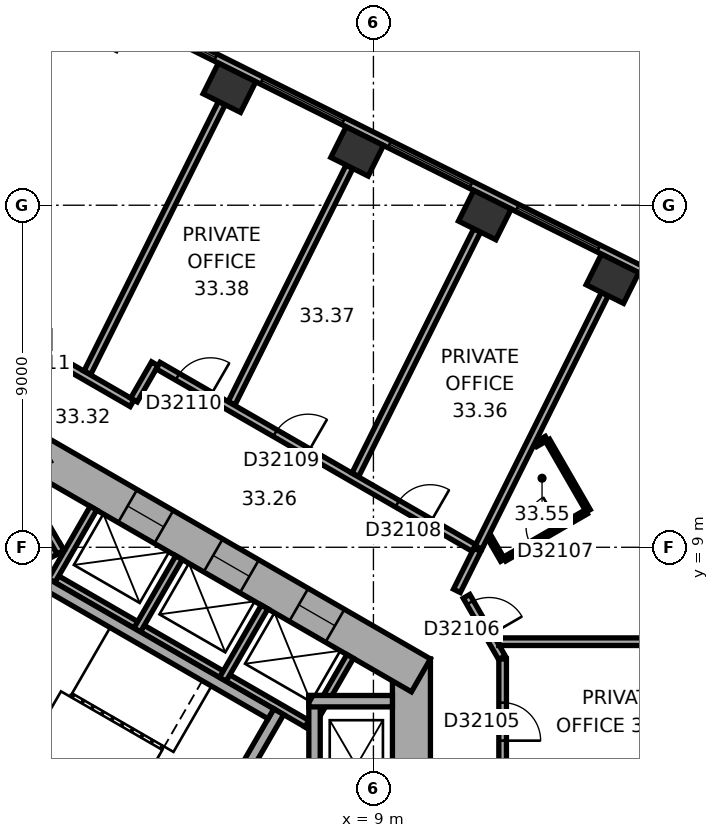
"""IFC4 building model, lengths in metres.
Left out: names, types, materials, properties, quantities, classifications, styles, units other than length and angle.
Written with IfcOpenShell. Run it as: python <this file> out.ifc"""

import sys

from ifc_helpers import new_model, si_unit, direction, frame, frame_2d, origin, origin_2d, place, context, subcontext, project, spatial, rectangle, extrude, element, fill, save


model = new_model("IFC4")
c1 = context("Model", 3, precision=1e-05, world=origin(), true_north=direction((0.0, 1.0)))
c2 = subcontext(c1, "Body", "Model", "MODEL_VIEW")
j1 = project(units=[si_unit("LENGTHUNIT", "METRE"), si_unit("PLANEANGLEUNIT", "RADIAN")], contexts=[c1])
p1 = place(None, origin())
s1 = spatial("IfcSite", under=j1, at=p1, CompositionType="ELEMENT")
p2 = place(p1, origin())
s2 = spatial("IfcBuilding", under=s1, at=p2, CompositionType="ELEMENT")
p3 = place(p2, frame((0.0, 0.0, 135.5)))
s3 = spatial("IfcBuildingStorey", under=s2, at=p3, CompositionType="ELEMENT", Elevation=135.5)
for number, where, z_axis, x_axis in (
    (1, (15.29, 16.065, 0.0), (0.0, 0.0, 1.0), (-0.895, 0.446, 0.0)),
    (2, (11.931, 17.74, 0.0), (0.0, 0.0, 1.0), (-0.895, 0.446, 0.0)),
    (3, (8.571, 19.416, 0.0), (0.0, 0.0, 1.0), (-0.895, 0.446, 0.0)),
    (4, (5.211, 21.091, 0.0), (0.0, 0.0, 1.0), (-0.895, 0.446, 0.0)),
):
    element("IfcColumn", number, at=place(p3, frame(where, z_axis=z_axis, x_axis=x_axis)), inside=s3, PredefinedType="COLUMN", context=c2, shape_type="SweptSolid", body=[
        extrude(rectangle(XDim=1.1, YDim=0.9, at=origin_2d()), origin(), (0.0, 0.0, 1.0), 3.7),
    ])
p4 = place(p3, frame((10.0, -6.062, 0.0), z_axis=(0.0, 0.0, 1.0), x_axis=(0.0, 1.0, 0.0)))
e5 = element("IfcWall", 5, at=p4, inside=s3, PredefinedType="SHEAR", context=c2, shape_type="SweptSolid", body=[
    extrude(rectangle(XDim=12.125, YDim=1.0, at=frame_2d((6.062, 0.0))), origin(), (0.0, 0.0, 1.0), 3.7),
])
p5 = place(p4, frame((6.262, 0.0, 0.0)))
e6 = element("IfcOpeningElement", 6, at=p5, cuts=e5, PredefinedType="OPENING", context=c2, shape_type="SweptSolid", body=[
    extrude(rectangle(XDim=1.5, YDim=2.1, at=frame_2d((0.75, 1.05))), frame((0.0, 0.51, 0.0), z_axis=(0.0, -1.0, 0.0), x_axis=(1.0, 0.0, 0.0)), (0.0, 0.0, 1.0), 1.02),
])
p6 = place(p4, frame((1.712, 0.0, 0.0)))
e7 = element("IfcOpeningElement", 7, at=p6, cuts=e5, PredefinedType="OPENING", context=c2, shape_type="SweptSolid", body=[
    extrude(rectangle(XDim=1.1, YDim=2.1, at=frame_2d((0.55, 1.05))), frame((0.0, 0.51, 0.0), z_axis=(0.0, -1.0, 0.0), x_axis=(1.0, 0.0, 0.0)), (0.0, 0.0, 1.0), 1.02),
])
p7 = place(p4, frame((4.312, 0.0, 0.0)))
e8 = element("IfcOpeningElement", 8, at=p7, cuts=e5, PredefinedType="OPENING", context=c2, shape_type="SweptSolid", body=[
    extrude(rectangle(XDim=1.1, YDim=2.1, at=frame_2d((0.55, 1.05))), frame((0.0, 0.51, 0.0), z_axis=(0.0, -1.0, 0.0), x_axis=(1.0, 0.0, 0.0)), (0.0, 0.0, 1.0), 1.02),
])
p8 = place(p3, frame((10.25, 5.629, 0.0), z_axis=(0.0, 0.0, 1.0), x_axis=(-0.866022616891, 0.50000482701, 0.0)))
e9 = element("IfcWall", 9, at=p8, inside=s3, PredefinedType="SHEAR", context=c2, shape_type="SweptSolid", body=[
    extrude(rectangle(XDim=12.125, YDim=1.0, at=frame_2d((6.062, 0.0))), origin(), (0.0, 0.0, 1.0), 3.7),
])
p9 = place(p8, frame((2.612, 0.0, 0.0)))
e10 = element("IfcOpeningElement", 10, at=p9, cuts=e9, PredefinedType="OPENING", context=c2, shape_type="SweptSolid", body=[
    extrude(rectangle(XDim=1.1, YDim=2.1, at=frame_2d((0.55, 1.05))), frame((0.0, 0.51, 0.0), z_axis=(0.0, -1.0, 0.0), x_axis=(1.0, 0.0, 0.0)), (0.0, 0.0, 1.0), 1.02),
])
p10 = place(p8, frame((5.212, 0.0, 0.0)))
e11 = element("IfcOpeningElement", 11, at=p10, cuts=e9, PredefinedType="OPENING", context=c2, shape_type="SweptSolid", body=[
    extrude(rectangle(XDim=1.1, YDim=2.1, at=frame_2d((0.55, 1.05))), frame((0.0, 0.51, 0.0), z_axis=(0.0, -1.0, 0.0), x_axis=(1.0, 0.0, 0.0)), (0.0, 0.0, 1.0), 1.02),
])
p11 = place(p8, frame((7.812, 0.0, 0.0)))
e12 = element("IfcOpeningElement", 12, at=p11, cuts=e9, PredefinedType="OPENING", context=c2, shape_type="SweptSolid", body=[
    extrude(rectangle(XDim=1.1, YDim=2.1, at=frame_2d((0.55, 1.05))), frame((0.0, 0.51, 0.0), z_axis=(0.0, -1.0, 0.0), x_axis=(1.0, 0.0, 0.0)), (0.0, 0.0, 1.0), 1.02),
])
p12 = place(p3, frame((19.464, 14.599, 0.0), z_axis=(0.0, 0.0, 1.0), x_axis=(-0.894935755043, 0.446195018289, 0.0)))
e13 = element("IfcWall", 13, at=p12, inside=s3, PredefinedType="STANDARD", context=c2, shape_type="SweptSolid", body=[
    extrude(rectangle(XDim=20.044, YDim=0.2, at=frame_2d((10.022, 0.0))), origin(), (0.0, 0.0, 1.0), 3.7),
])
p13 = place(p12, frame((1.313, 0.0, 0.9)))
e14 = element("IfcOpeningElement", 14, at=p13, cuts=e13, PredefinedType="OPENING", context=c2, shape_type="SweptSolid", body=[
    extrude(rectangle(XDim=2.4, YDim=2.0, at=frame_2d((1.2, 1.0))), frame((0.0, 0.11, 0.0), z_axis=(0.0, -1.0, 0.0), x_axis=(1.0, 0.0, 0.0)), (0.0, 0.0, 1.0), 0.22),
])
p14 = place(p12, frame((5.067, 0.0, 0.9)))
e15 = element("IfcOpeningElement", 15, at=p14, cuts=e13, PredefinedType="OPENING", context=c2, shape_type="SweptSolid", body=[
    extrude(rectangle(XDim=2.4, YDim=2.0, at=frame_2d((1.2, 1.0))), frame((0.0, 0.11, 0.0), z_axis=(0.0, -1.0, 0.0), x_axis=(1.0, 0.0, 0.0)), (0.0, 0.0, 1.0), 0.22),
])
p15 = place(p12, frame((8.821, 0.0, 0.9)))
e16 = element("IfcOpeningElement", 16, at=p15, cuts=e13, PredefinedType="OPENING", context=c2, shape_type="SweptSolid", body=[
    extrude(rectangle(XDim=2.4, YDim=2.0, at=frame_2d((1.2, 1.0))), frame((0.0, 0.11, 0.0), z_axis=(0.0, -1.0, 0.0), x_axis=(1.0, 0.0, 0.0)), (0.0, 0.0, 1.0), 0.22),
])
p16 = place(p12, frame((12.575, 0.0, 0.9)))
e17 = element("IfcOpeningElement", 17, at=p16, cuts=e13, PredefinedType="OPENING", context=c2, shape_type="SweptSolid", body=[
    extrude(rectangle(XDim=2.4, YDim=2.0, at=frame_2d((1.2, 1.0))), frame((0.0, 0.11, 0.0), z_axis=(0.0, -1.0, 0.0), x_axis=(1.0, 0.0, 0.0)), (0.0, 0.0, 1.0), 0.22),
])
p17 = place(p12, frame((16.329, 0.0, 0.9)))
e18 = element("IfcOpeningElement", 18, at=p17, cuts=e13, PredefinedType="OPENING", context=c2, shape_type="SweptSolid", body=[
    extrude(rectangle(XDim=2.4, YDim=2.0, at=frame_2d((1.2, 1.0))), frame((0.0, 0.11, 0.0), z_axis=(0.0, -1.0, 0.0), x_axis=(1.0, 0.0, 0.0)), (0.0, 0.0, 1.0), 0.22),
])
p18 = place(p3, frame((7.424, 4.259, 0.0), z_axis=(0.0, 0.0, 1.0), x_axis=(-0.866026010844, 0.49999894854, 0.0)))
e19 = element("IfcWall", 19, at=p18, inside=s3, PredefinedType="PARTITIONING", context=c2, shape_type="SweptSolid", body=[
    extrude(rectangle(XDim=8.0, YDim=0.2, at=frame_2d((4.0, 0.0))), origin(), (0.0, 0.0, 1.0), 3.35),
])
for number, where, z_axis, x_axis in (
    (20, (7.287, 4.222, 0.0), (0.0, 0.0, 1.0), (0.5, 0.866, 0.0)),
    (21, (5.036, 5.522, 0.0), (0.0, 0.0, 1.0), (0.5, 0.866, 0.0)),
    (22, (2.784, 6.822, 0.0), (0.0, 0.0, 1.0), (0.5, 0.866, 0.0)),
    (23, (0.532, 8.122, 0.0), (0.0, 0.0, 1.0), (0.5, 0.866, 0.0)),
):
    element("IfcWall", number, at=place(p3, frame(where, z_axis=z_axis, x_axis=x_axis)), inside=s3, PredefinedType="PARTITIONING", context=c2, shape_type="SweptSolid", body=[
        extrude(rectangle(XDim=2.2, YDim=0.2, at=frame_2d((1.1, 0.0))), origin(), (0.0, 0.0, 1.0), 3.35),
    ])
p19 = place(p3, frame((0.803, 9.009, 0.0), z_axis=(0.0, 0.0, 1.0), x_axis=(-0.866028230842, -0.499995103361, 0.0)))
e24 = element("IfcWall", 24, at=p19, inside=s3, PredefinedType="PARTITIONING", context=c2, shape_type="SweptSolid", body=[
    extrude(rectangle(XDim=5.4, YDim=0.2, at=frame_2d((2.7, 0.0))), origin(), (0.0, 0.0, 1.0), 3.35),
])
p20 = place(p3, frame((0.767, 8.872, 0.0), z_axis=(0.0, 0.0, 1.0), x_axis=(-0.499994660107, 0.866028486751, 0.0)))
e25 = element("IfcWall", 25, at=p20, inside=s3, PredefinedType="PARTITIONING", context=c2, shape_type="SweptSolid", body=[
    extrude(rectangle(XDim=2.2, YDim=0.2, at=frame_2d((1.1, 0.0))), origin(), (0.0, 0.0, 1.0), 3.35),
])
p21 = place(p3, frame((4.158, 0.602, 0.0), z_axis=(0.0, 0.0, 1.0), x_axis=(0.499977259774, 0.866038532462, 0.0)))
e26 = element("IfcWall", 26, at=p21, inside=s3, PredefinedType="SHEAR", context=c2, shape_type="SweptSolid", body=[
    extrude(rectangle(XDim=4.7, YDim=0.3, at=frame_2d((2.35, 0.0))), origin(), (0.0, 0.0, 1.0), 3.35),
])
p22 = place(p21, frame((0.8, 0.0, 0.0)))
e27 = element("IfcOpeningElement", 27, at=p22, cuts=e26, PredefinedType="OPENING", context=c2, shape_type="SweptSolid", body=[
    extrude(rectangle(XDim=1.2, YDim=2.1, at=frame_2d((0.6, 1.05))), frame((0.0, 0.16, 0.0), z_axis=(0.0, -1.0, 0.0), x_axis=(1.0, 0.0, 0.0)), (0.0, 0.0, 1.0), 0.32),
])
for number, where, z_axis, x_axis in (
    (28, (4.103, 0.807, 0.0), (0.0, 0.0, 1.0), (-0.866, 0.5, 0.0)),
    (29, (6.303, 4.617, 0.0), (0.0, 0.0, 1.0), (-0.866, 0.5, 0.0)),
):
    element("IfcWall", number, at=place(p3, frame(where, z_axis=z_axis, x_axis=x_axis)), inside=s3, PredefinedType="SHEAR", context=c2, shape_type="SweptSolid", body=[
        extrude(rectangle(XDim=7.06, YDim=0.3, at=frame_2d((3.53, 0.0))), origin(), (0.0, 0.0, 1.0), 3.35),
    ])
p23 = place(p3, frame((7.45, 1.75, 0.0), z_axis=(0.0, 0.0, 1.0), x_axis=(0.0, 1.0, 0.0)))
e30 = element("IfcWall", 30, at=p23, inside=s3, PredefinedType="SHEAR", context=c2, shape_type="SweptSolid", body=[
    extrude(rectangle(XDim=3.35, YDim=0.3, at=frame_2d((1.675, 0.0))), origin(), (0.0, 0.0, 1.0), 3.35),
])
p24 = place(p3, frame((7.3, 4.95, 0.0), z_axis=(0.0, 0.0, 1.0), x_axis=(1.0, 0.0, 0.0)))
e31 = element("IfcWall", 31, at=p24, inside=s3, PredefinedType="SHEAR", context=c2, shape_type="SweptSolid", body=[
    extrude(rectangle(XDim=2.2, YDim=0.3, at=frame_2d((1.1, 0.0))), origin(), (0.0, 0.0, 1.0), 3.35),
])
p25 = place(p3, frame((0.95, 13.77, 0.0), z_axis=(0.0, 0.0, 1.0), x_axis=(-1.0, 0.0, 0.0)))
e32 = element("IfcWall", 32, at=p25, inside=s3, PredefinedType="PARTITIONING", context=c2, shape_type="SweptSolid", body=[
    extrude(rectangle(XDim=1.86, YDim=0.2, at=frame_2d((0.93, 0.0))), origin(), (0.0, 0.0, 1.0), 3.35),
])
p26 = place(p25, frame((0.43, 0.0, 0.0)))
e33 = element("IfcOpeningElement", 33, at=p26, cuts=e32, PredefinedType="OPENING", context=c2, shape_type="SweptSolid", body=[
    extrude(rectangle(XDim=1.0, YDim=2.1, at=frame_2d((0.5, 1.05))), frame((0.0, 0.11, 0.0), z_axis=(0.0, -1.0, 0.0), x_axis=(1.0, 0.0, 0.0)), (0.0, 0.0, 1.0), 0.22),
])
p27 = place(p3, frame((2.648, 12.789, 0.0), z_axis=(0.0, 0.0, 1.0), x_axis=(-0.8660607342, 0.499938800931, 0.0)))
e34 = element("IfcWall", 34, at=p27, inside=s3, PredefinedType="PARTITIONING", context=c2, shape_type="SweptSolid", body=[
    extrude(rectangle(XDim=1.921, YDim=0.2, at=frame_2d((0.96, 0.0))), origin(), (0.0, 0.0, 1.0), 3.35),
])
p28 = place(p3, frame((3.249, 13.829, 0.0), z_axis=(0.0, 0.0, 1.0), x_axis=(-0.499812034598, -0.866133898465, 0.0)))
e35 = element("IfcWall", 35, at=p28, inside=s3, PredefinedType="PARTITIONING", context=c2, shape_type="SweptSolid", body=[
    extrude(rectangle(XDim=1.101, YDim=0.2, at=frame_2d((0.551, 0.0))), origin(), (0.0, 0.0, 1.0), 3.35),
])
p29 = place(p3, frame((5.01, 20.688, 0.0), z_axis=(0.0, 0.0, 1.0), x_axis=(-0.446203062394, -0.894931744386, 0.0)))
e36 = element("IfcWall", 36, at=p29, inside=s3, PredefinedType="PARTITIONING", context=c2, shape_type="SweptSolid", body=[
    extrude(rectangle(XDim=7.927, YDim=0.2, at=frame_2d((3.963, 0.0))), origin(), (0.0, 0.0, 1.0), 2.55),
])
p30 = place(p3, frame((8.37, 19.013, 0.0), z_axis=(0.0, 0.0, 1.0), x_axis=(-0.446187985757, -0.894939261272, 0.0)))
e37 = element("IfcWall", 37, at=p30, inside=s3, PredefinedType="PARTITIONING", context=c2, shape_type="SweptSolid", body=[
    extrude(rectangle(XDim=6.953, YDim=0.2, at=frame_2d((3.477, 0.0))), origin(), (0.0, 0.0, 1.0), 3.35),
])
p31 = place(p3, frame((11.196, 7.854, 0.0), z_axis=(0.0, 0.0, 1.0), x_axis=(0.446241040303, 0.894912808015, 0.0)))
e38 = element("IfcWall", 38, at=p31, inside=s3, PredefinedType="PARTITIONING", context=c2, shape_type="SweptSolid", body=[
    extrude(rectangle(XDim=1.205, YDim=0.2, at=frame_2d((0.603, 0.0))), origin(), (0.0, 0.0, 1.0), 3.35),
])
p32 = place(p3, frame((11.646, 8.981, 0.0), z_axis=(0.0, 0.0, 1.0), x_axis=(-0.866027142779, 0.499996987961, 0.0)))
e39 = element("IfcWall", 39, at=p32, inside=s3, PredefinedType="PARTITIONING", context=c2, shape_type="SweptSolid", body=[
    extrude(rectangle(XDim=9.597, YDim=0.2, at=frame_2d((4.798, 0.0))), origin(), (0.0, 0.0, 1.0), 3.35),
])
p33 = place(p32, frame((1.331, 0.0, 0.0)))
e40 = element("IfcOpeningElement", 40, at=p33, cuts=e39, PredefinedType="OPENING", context=c2, shape_type="SweptSolid", body=[
    extrude(rectangle(XDim=1.0, YDim=2.1, at=frame_2d((0.5, 1.05))), frame((0.0, 0.11, 0.0), z_axis=(0.0, -1.0, 0.0), x_axis=(1.0, 0.0, 0.0)), (0.0, 0.0, 1.0), 0.22),
])
p34 = place(p32, frame((5.042, 0.0, 0.0)))
e41 = element("IfcOpeningElement", 41, at=p34, cuts=e39, PredefinedType="OPENING", context=c2, shape_type="SweptSolid", body=[
    extrude(rectangle(XDim=1.0, YDim=2.1, at=frame_2d((0.5, 1.05))), frame((0.0, 0.11, 0.0), z_axis=(0.0, -1.0, 0.0), x_axis=(1.0, 0.0, 0.0)), (0.0, 0.0, 1.0), 0.22),
])
p35 = place(p32, frame((8.01, 0.0, 0.0)))
e42 = element("IfcOpeningElement", 42, at=p35, cuts=e39, PredefinedType="OPENING", context=c2, shape_type="SweptSolid", body=[
    extrude(rectangle(XDim=1.0, YDim=2.1, at=frame_2d((0.5, 1.05))), frame((0.0, 0.11, 0.0), z_axis=(0.0, -1.0, 0.0), x_axis=(1.0, 0.0, 0.0)), (0.0, 0.0, 1.0), 0.22),
])
p36 = place(p3, frame((11.73, 17.338, 0.0), z_axis=(0.0, 0.0, 1.0), x_axis=(-0.446193589186, -0.894936467561, 0.0)))
e43 = element("IfcWall", 43, at=p36, inside=s3, PredefinedType="PARTITIONING", context=c2, shape_type="SweptSolid", body=[
    extrude(rectangle(XDim=7.183, YDim=0.2, at=frame_2d((3.591, 0.0))), origin(), (0.0, 0.0, 1.0), 2.55),
])
p37 = place(p3, frame((12.38, 6.097, 0.0), z_axis=(0.0, 0.0, 1.0), x_axis=(-0.499964847546, 0.866045698112, 0.0)))
e44 = element("IfcWall", 44, at=p37, inside=s3, PredefinedType="PARTITIONING", context=c2, shape_type="SweptSolid", body=[
    extrude(rectangle(XDim=1.86, YDim=0.2, at=frame_2d((0.93, 0.0))), origin(), (0.0, 0.0, 1.0), 3.35),
])
p38 = place(p37, frame((0.672, 0.0, 0.0)))
e45 = element("IfcOpeningElement", 45, at=p38, cuts=e44, PredefinedType="OPENING", context=c2, shape_type="SweptSolid", body=[
    extrude(rectangle(XDim=1.0, YDim=2.1, at=frame_2d((0.5, 1.05))), frame((0.0, 0.11, 0.0), z_axis=(0.0, -1.0, 0.0), x_axis=(1.0, 0.0, 0.0)), (0.0, 0.0, 1.0), 0.22),
])
p39 = place(p3, frame((12.4, 0.201, 0.0), z_axis=(0.0, 0.0, 1.0), x_axis=(0.0, 1.0, 0.0)))
e46 = element("IfcWall", 46, at=p39, inside=s3, PredefinedType="PARTITIONING", context=c2, shape_type="SweptSolid", body=[
    extrude(rectangle(XDim=5.861, YDim=0.2, at=frame_2d((2.931, 0.0))), origin(), (0.0, 0.0, 1.0), 3.35),
])
p40 = place(p39, frame((3.711, 0.0, 0.0)))
e47 = element("IfcOpeningElement", 47, at=p40, cuts=e46, PredefinedType="OPENING", context=c2, shape_type="SweptSolid", body=[
    extrude(rectangle(XDim=1.0, YDim=2.1, at=frame_2d((0.5, 1.05))), frame((0.0, 0.11, 0.0), z_axis=(0.0, -1.0, 0.0), x_axis=(1.0, 0.0, 0.0)), (0.0, 0.0, 1.0), 0.22),
])
p41 = place(p3, frame((12.401, 8.661, 0.0), z_axis=(0.0, 0.0, 1.0), x_axis=(-0.499831418649, 0.866122712398, 0.0)))
e48 = element("IfcWall", 48, at=p41, inside=s3, PredefinedType="PARTITIONING", context=c2, shape_type="SweptSolid", body=[
    extrude(rectangle(XDim=0.711, YDim=0.12, at=frame_2d((0.355, 0.0))), origin(), (0.0, 0.0, 1.0), 3.35),
])
p42 = place(p3, frame((13.269, 11.702, 0.0), z_axis=(0.0, 0.0, 1.0), x_axis=(0.865936922628, 0.500153222552, 0.0)))
e49 = element("IfcWall", 49, at=p42, inside=s3, PredefinedType="PARTITIONING", context=c2, shape_type="SweptSolid", body=[
    extrude(rectangle(XDim=0.327, YDim=0.12, at=frame_2d((0.164, 0.0))), origin(), (0.0, 0.0, 1.0), 3.35),
])
p43 = place(p3, frame((13.583, 11.814, 0.0), z_axis=(0.0, 0.0, 1.0), x_axis=(0.500028586798, -0.86600889856, 0.0)))
e50 = element("IfcWall", 50, at=p43, inside=s3, PredefinedType="PARTITIONING", context=c2, shape_type="SweptSolid", body=[
    extrude(rectangle(XDim=2.14, YDim=0.12, at=frame_2d((1.07, 0.0))), origin(), (0.0, 0.0, 1.0), 3.35),
])
p44 = place(p3, frame((14.601, 9.931, 0.0), z_axis=(0.0, 0.0, 1.0), x_axis=(-0.866023285932, -0.50000366821, 0.0)))
e51 = element("IfcWall", 51, at=p44, inside=s3, PredefinedType="PARTITIONING", context=c2, shape_type="SweptSolid", body=[
    extrude(rectangle(XDim=2.48, YDim=0.12, at=frame_2d((1.24, 0.0))), origin(), (0.0, 0.0, 1.0), 3.35),
])
p45 = place(p44, frame((0.79, 0.0, 0.0)))
e52 = element("IfcOpeningElement", 52, at=p45, cuts=e51, PredefinedType="OPENING", context=c2, shape_type="SweptSolid", body=[
    extrude(rectangle(XDim=0.9, YDim=2.1, at=frame_2d((0.45, 1.05))), frame((0.0, 0.07, 0.0), z_axis=(0.0, -1.0, 0.0), x_axis=(1.0, 0.0, 0.0)), (0.0, 0.0, 1.0), 0.14),
])
p46 = place(p3, frame((15.09, 15.663, 0.0), z_axis=(0.0, 0.0, 1.0), x_axis=(-0.446203977428, -0.89493128816, 0.0)))
e53 = element("IfcWall", 53, at=p46, inside=s3, PredefinedType="PARTITIONING", context=c2, shape_type="SweptSolid", body=[
    extrude(rectangle(XDim=7.45, YDim=0.2, at=frame_2d((3.725, 0.0))), origin(), (0.0, 0.0, 1.0), 3.35),
])
p47 = place(p3, frame((20.75, 6.515, 0.0), z_axis=(0.0, 0.0, 1.0), x_axis=(-1.0, 0.0, 0.0)))
e54 = element("IfcWall", 54, at=p47, inside=s3, PredefinedType="PARTITIONING", context=c2, shape_type="SweptSolid", body=[
    extrude(rectangle(XDim=8.452, YDim=0.2, at=frame_2d((4.226, 0.0))), origin(), (0.0, 0.0, 1.0), 3.35),
])
p48 = place(p14, origin())
e55 = element("IfcWindow", 55, at=p48, inside=s3, PartitioningType="SINGLE_PANEL", PredefinedType="WINDOW", context=c2, shape_type="SweptSolid", body=[
    extrude(rectangle(XDim=2.4, YDim=2.0, at=frame_2d((1.2, 1.0))), frame((0.0, 0.03, 0.0), z_axis=(0.0, -1.0, 0.0), x_axis=(1.0, 0.0, 0.0)), (0.0, 0.0, 1.0), 0.06),
])
fill(e15, e55)
p49 = place(p15, origin())
e56 = element("IfcWindow", 56, at=p49, inside=s3, PartitioningType="SINGLE_PANEL", PredefinedType="WINDOW", context=c2, shape_type="SweptSolid", body=[
    extrude(rectangle(XDim=2.4, YDim=2.0, at=frame_2d((1.2, 1.0))), frame((0.0, 0.03, 0.0), z_axis=(0.0, -1.0, 0.0), x_axis=(1.0, 0.0, 0.0)), (0.0, 0.0, 1.0), 0.06),
])
fill(e16, e56)
p50 = place(p16, origin())
e57 = element("IfcWindow", 57, at=p50, inside=s3, PartitioningType="SINGLE_PANEL", PredefinedType="WINDOW", context=c2, shape_type="SweptSolid", body=[
    extrude(rectangle(XDim=2.4, YDim=2.0, at=frame_2d((1.2, 1.0))), frame((0.0, 0.03, 0.0), z_axis=(0.0, -1.0, 0.0), x_axis=(1.0, 0.0, 0.0)), (0.0, 0.0, 1.0), 0.06),
])
fill(e17, e57)
p51 = place(p17, origin())
e58 = element("IfcWindow", 58, at=p51, inside=s3, PartitioningType="SINGLE_PANEL", PredefinedType="WINDOW", context=c2, shape_type="SweptSolid", body=[
    extrude(rectangle(XDim=2.4, YDim=2.0, at=frame_2d((1.2, 1.0))), frame((0.0, 0.03, 0.0), z_axis=(0.0, -1.0, 0.0), x_axis=(1.0, 0.0, 0.0)), (0.0, 0.0, 1.0), 0.06),
])
fill(e18, e58)
p52 = place(p9, origin())
e59 = element("IfcDoor", 59, at=p52, inside=s3, OperationType="DOUBLE_DOOR_SLIDING", PredefinedType="DOOR", context=c2, shape_type="SweptSolid", body=[
    extrude(rectangle(XDim=1.1, YDim=2.1, at=frame_2d((0.55, 1.05))), frame((0.0, 0.025, 0.0), z_axis=(0.0, -1.0, 0.0), x_axis=(1.0, 0.0, 0.0)), (0.0, 0.0, 1.0), 0.05),
])
fill(e10, e59)
p53 = place(p10, origin())
e60 = element("IfcDoor", 60, at=p53, inside=s3, OperationType="DOUBLE_DOOR_SLIDING", PredefinedType="DOOR", context=c2, shape_type="SweptSolid", body=[
    extrude(rectangle(XDim=1.1, YDim=2.1, at=frame_2d((0.55, 1.05))), frame((0.0, 0.025, 0.0), z_axis=(0.0, -1.0, 0.0), x_axis=(1.0, 0.0, 0.0)), (0.0, 0.0, 1.0), 0.05),
])
fill(e11, e60)
p54 = place(p11, origin())
e61 = element("IfcDoor", 61, at=p54, inside=s3, OperationType="DOUBLE_DOOR_SLIDING", PredefinedType="DOOR", context=c2, shape_type="SweptSolid", body=[
    extrude(rectangle(XDim=1.1, YDim=2.1, at=frame_2d((0.55, 1.05))), frame((0.0, 0.025, 0.0), z_axis=(0.0, -1.0, 0.0), x_axis=(1.0, 0.0, 0.0)), (0.0, 0.0, 1.0), 0.05),
])
fill(e12, e61)
p55 = place(p40, origin())
e62 = element("IfcDoor", 62, at=p55, inside=s3, OperationType="SINGLE_SWING_LEFT", PredefinedType="DOOR", context=c2, shape_type="SweptSolid", body=[
    extrude(rectangle(XDim=1.0, YDim=2.1, at=frame_2d((0.5, 1.05))), frame((0.0, 0.025, 0.0), z_axis=(0.0, -1.0, 0.0), x_axis=(1.0, 0.0, 0.0)), (0.0, 0.0, 1.0), 0.05),
])
fill(e47, e62)
p56 = place(p38, origin())
e63 = element("IfcDoor", 63, at=p56, inside=s3, OperationType="SINGLE_SWING_LEFT", PredefinedType="DOOR", context=c2, shape_type="SweptSolid", body=[
    extrude(rectangle(XDim=1.0, YDim=2.1, at=frame_2d((0.5, 1.05))), frame((0.0, 0.025, 0.0), z_axis=(0.0, -1.0, 0.0), x_axis=(1.0, 0.0, 0.0)), (0.0, 0.0, 1.0), 0.05),
])
fill(e45, e63)
p57 = place(p45, origin())
e64 = element("IfcDoor", 64, at=p57, inside=s3, OperationType="SINGLE_SWING_LEFT", PredefinedType="DOOR", context=c2, shape_type="SweptSolid", body=[
    extrude(rectangle(XDim=0.9, YDim=2.1, at=frame_2d((0.45, 1.05))), frame((0.0, 0.025, 0.0), z_axis=(0.0, -1.0, 0.0), x_axis=(1.0, 0.0, 0.0)), (0.0, 0.0, 1.0), 0.05),
])
fill(e52, e64)
p58 = place(p33, origin())
e65 = element("IfcDoor", 65, at=p58, inside=s3, OperationType="SINGLE_SWING_LEFT", PredefinedType="DOOR", context=c2, shape_type="SweptSolid", body=[
    extrude(rectangle(XDim=1.0, YDim=2.1, at=frame_2d((0.5, 1.05))), frame((0.0, 0.025, 0.0), z_axis=(0.0, -1.0, 0.0), x_axis=(1.0, 0.0, 0.0)), (0.0, 0.0, 1.0), 0.05),
])
fill(e40, e65)
p59 = place(p34, origin())
e66 = element("IfcDoor", 66, at=p59, inside=s3, OperationType="SINGLE_SWING_LEFT", PredefinedType="DOOR", context=c2, shape_type="SweptSolid", body=[
    extrude(rectangle(XDim=1.0, YDim=2.1, at=frame_2d((0.5, 1.05))), frame((0.0, 0.025, 0.0), z_axis=(0.0, -1.0, 0.0), x_axis=(1.0, 0.0, 0.0)), (0.0, 0.0, 1.0), 0.05),
])
fill(e41, e66)
p60 = place(p35, origin())
e67 = element("IfcDoor", 67, at=p60, inside=s3, OperationType="SINGLE_SWING_LEFT", PredefinedType="DOOR", context=c2, shape_type="SweptSolid", body=[
    extrude(rectangle(XDim=1.0, YDim=2.1, at=frame_2d((0.5, 1.05))), frame((0.0, 0.025, 0.0), z_axis=(0.0, -1.0, 0.0), x_axis=(1.0, 0.0, 0.0)), (0.0, 0.0, 1.0), 0.05),
])
fill(e42, e67)
save(model, sys.argv[1])
